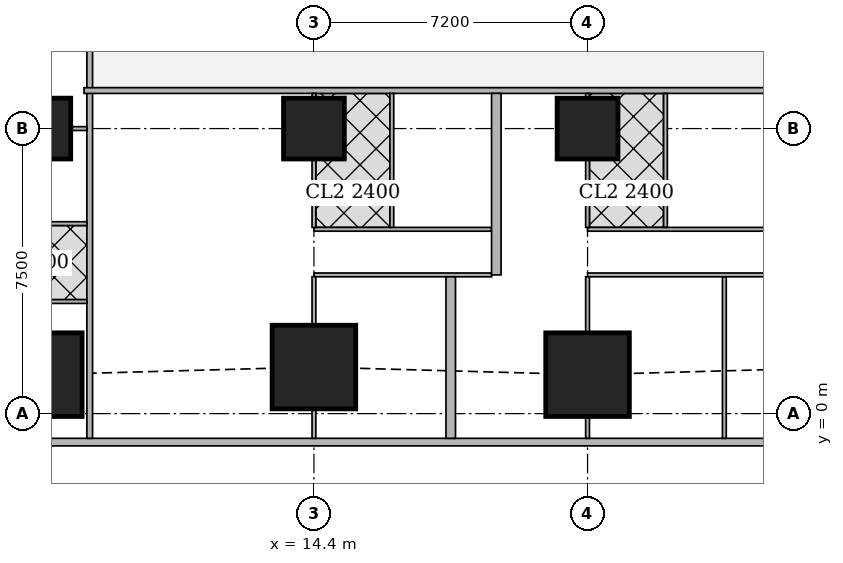
"""IFC4 building model, lengths in metres.
Left out: names, types, materials, properties, quantities, classifications, styles, units other than length and angle.
Written with IfcOpenShell. Run it as: python <this file> out.ifc"""

import sys

from ifc_helpers import new_model, si_unit, direction, frame, frame_2d, origin, origin_2d, place, context, subcontext, project, spatial, rectangle, extrude, element, fill, save


model = new_model("IFC4")
c1 = context("Model", 3, precision=1e-05, world=origin(), true_north=direction((0.0, 1.0)))
c2 = subcontext(c1, "Body", "Model", "MODEL_VIEW")
j1 = project(units=[si_unit("LENGTHUNIT", "METRE"), si_unit("PLANEANGLEUNIT", "RADIAN")], contexts=[c1])
p1 = place(None, origin())
s1 = spatial("IfcSite", under=j1, at=p1, CompositionType="ELEMENT")
p2 = place(p1, origin())
s2 = spatial("IfcBuilding", under=s1, at=p2, CompositionType="ELEMENT")
p3 = place(p2, frame((0.0, 0.0, 111.65)))
s3 = spatial("IfcBuildingStorey", under=s2, at=p3, CompositionType="ELEMENT", Elevation=111.65)
for number, where, z_axis, x_axis in (
    (1, (7.2, 1.025, 0.0), (0.0, 0.0, 1.0), (1.0, 0.0, 0.0)),
    (2, (14.4, 1.225, 0.0), (0.0, 0.0, 1.0), (1.0, 0.0, 0.0)),
    (3, (21.6, 1.025, 0.0), (0.0, 0.0, 1.0), (1.0, 0.0, 0.0)),
):
    element("IfcColumn", number, at=place(p3, frame(where, z_axis=z_axis, x_axis=x_axis)), inside=s3, PredefinedType="COLUMN", context=c2, shape_type="SweptSolid", body=[
        extrude(rectangle(XDim=2.2, YDim=2.2, at=origin_2d()), origin(), (0.0, 0.0, 1.0), 3.75),
    ])
for number, where, z_axis, x_axis in (
    (4, (7.2, 7.5, 0.0), (0.0, 0.0, 1.0), (1.0, 0.0, 0.0)),
    (5, (14.4, 7.5, 0.0), (0.0, 0.0, 1.0), (1.0, 0.0, 0.0)),
    (6, (21.6, 7.5, 0.0), (0.0, 0.0, 1.0), (1.0, 0.0, 0.0)),
):
    element("IfcColumn", number, at=place(p3, frame(where, z_axis=z_axis, x_axis=x_axis)), inside=s3, PredefinedType="COLUMN", context=c2, shape_type="SweptSolid", body=[
        extrude(rectangle(XDim=1.6, YDim=1.6, at=origin_2d()), origin(), (0.0, 0.0, 1.0), 3.75),
    ])
p4 = place(p3, frame((2.163, -0.75, 0.0), z_axis=(0.0, 0.0, 1.0), x_axis=(1.0, 0.0, 0.0)))
e7 = element("IfcWall", 7, at=p4, inside=s3, PredefinedType="SOLIDWALL", context=c2, shape_type="SweptSolid", body=[
    extrude(rectangle(XDim=45.628, YDim=0.2, at=frame_2d((22.814, 0.0))), origin(), (0.0, 0.0, 1.0), 3.5),
])
p5 = place(p4, frame((9.537, 0.0, 0.9)))
e8 = element("IfcOpeningElement", 8, at=p5, cuts=e7, PredefinedType="OPENING", context=c2, shape_type="SweptSolid", body=[
    extrude(rectangle(XDim=1.8, YDim=1.5, at=frame_2d((0.9, 0.75))), frame((0.0, 0.11, 0.0), z_axis=(0.0, -1.0, 0.0), x_axis=(1.0, 0.0, 0.0)), (0.0, 0.0, 1.0), 0.22),
])
p6 = place(p4, frame((13.137, 0.0, 0.9)))
e9 = element("IfcOpeningElement", 9, at=p6, cuts=e7, PredefinedType="OPENING", context=c2, shape_type="SweptSolid", body=[
    extrude(rectangle(XDim=1.8, YDim=1.5, at=frame_2d((0.9, 0.75))), frame((0.0, 0.11, 0.0), z_axis=(0.0, -1.0, 0.0), x_axis=(1.0, 0.0, 0.0)), (0.0, 0.0, 1.0), 0.22),
])
p7 = place(p4, frame((16.737, 0.0, 0.9)))
e10 = element("IfcOpeningElement", 10, at=p7, cuts=e7, PredefinedType="OPENING", context=c2, shape_type="SweptSolid", body=[
    extrude(rectangle(XDim=1.8, YDim=1.5, at=frame_2d((0.9, 0.75))), frame((0.0, 0.11, 0.0), z_axis=(0.0, -1.0, 0.0), x_axis=(1.0, 0.0, 0.0)), (0.0, 0.0, 1.0), 0.22),
])
p8 = place(p4, frame((20.337, 0.0, 0.9)))
e11 = element("IfcOpeningElement", 11, at=p8, cuts=e7, PredefinedType="OPENING", context=c2, shape_type="SweptSolid", body=[
    extrude(rectangle(XDim=1.8, YDim=1.5, at=frame_2d((0.9, 0.75))), frame((0.0, 0.11, 0.0), z_axis=(0.0, -1.0, 0.0), x_axis=(1.0, 0.0, 0.0)), (0.0, 0.0, 1.0), 0.22),
])
p9 = place(p4, frame((23.937, 0.0, 0.9)))
e12 = element("IfcOpeningElement", 12, at=p9, cuts=e7, PredefinedType="OPENING", context=c2, shape_type="SweptSolid", body=[
    extrude(rectangle(XDim=1.8, YDim=1.5, at=frame_2d((0.9, 0.75))), frame((0.0, 0.11, 0.0), z_axis=(0.0, -1.0, 0.0), x_axis=(1.0, 0.0, 0.0)), (0.0, 0.0, 1.0), 0.22),
])
p10 = place(p4, frame((27.537, 0.0, 0.9)))
e13 = element("IfcOpeningElement", 13, at=p10, cuts=e7, PredefinedType="OPENING", context=c2, shape_type="SweptSolid", body=[
    extrude(rectangle(XDim=1.8, YDim=1.5, at=frame_2d((0.9, 0.75))), frame((0.0, 0.11, 0.0), z_axis=(0.0, -1.0, 0.0), x_axis=(1.0, 0.0, 0.0)), (0.0, 0.0, 1.0), 0.22),
])
p11 = place(p4, frame((31.137, 0.0, 0.9)))
e14 = element("IfcOpeningElement", 14, at=p11, cuts=e7, PredefinedType="OPENING", context=c2, shape_type="SweptSolid", body=[
    extrude(rectangle(XDim=1.8, YDim=1.5, at=frame_2d((0.9, 0.75))), frame((0.0, 0.11, 0.0), z_axis=(0.0, -1.0, 0.0), x_axis=(1.0, 0.0, 0.0)), (0.0, 0.0, 1.0), 0.22),
])
p12 = place(p4, frame((34.737, 0.0, 0.9)))
e15 = element("IfcOpeningElement", 15, at=p12, cuts=e7, PredefinedType="OPENING", context=c2, shape_type="SweptSolid", body=[
    extrude(rectangle(XDim=1.8, YDim=1.5, at=frame_2d((0.9, 0.75))), frame((0.0, 0.11, 0.0), z_axis=(0.0, -1.0, 0.0), x_axis=(1.0, 0.0, 0.0)), (0.0, 0.0, 1.0), 0.22),
])
p13 = place(p3, frame((8.5, -0.65, 0.0), z_axis=(0.0, 0.0, 1.0), x_axis=(0.0, 1.0, 0.0)))
e16 = element("IfcWall", 16, at=p13, inside=s3, PredefinedType="SOLIDWALL", context=c2, shape_type="SweptSolid", body=[
    extrude(rectangle(XDim=46.3, YDim=0.15, at=frame_2d((23.15, 0.0))), origin(), (0.0, 0.0, 1.0), 2.2),
])
p14 = place(p13, frame((9.525, 0.0, 0.0)))
e17 = element("IfcOpeningElement", 17, at=p14, cuts=e16, PredefinedType="OPENING", context=c2, shape_type="SweptSolid", body=[
    extrude(rectangle(XDim=1.0, YDim=2.1, at=frame_2d((0.5, 1.05))), frame((0.0, 0.085, 0.0), z_axis=(0.0, -1.0, 0.0), x_axis=(1.0, 0.0, 0.0)), (0.0, 0.0, 1.0), 0.17),
])
p15 = place(p13, frame((13.275, 0.0, 0.0)))
e18 = element("IfcOpeningElement", 18, at=p15, cuts=e16, PredefinedType="OPENING", context=c2, shape_type="SweptSolid", body=[
    extrude(rectangle(XDim=1.0, YDim=2.1, at=frame_2d((0.5, 1.05))), frame((0.0, 0.085, 0.0), z_axis=(0.0, -1.0, 0.0), x_axis=(1.0, 0.0, 0.0)), (0.0, 0.0, 1.0), 0.17),
])
p16 = place(p13, frame((25.15, 0.0, 0.0)))
e19 = element("IfcOpeningElement", 19, at=p16, cuts=e16, PredefinedType="OPENING", context=c2, shape_type="SweptSolid", body=[
    extrude(rectangle(XDim=1.0, YDim=2.1, at=frame_2d((0.5, 1.05))), frame((0.0, 0.085, 0.0), z_axis=(0.0, -1.0, 0.0), x_axis=(1.0, 0.0, 0.0)), (0.0, 0.0, 1.0), 0.17),
])
p17 = place(p3, frame((40.053, 8.5, 0.0), z_axis=(0.0, 0.0, 1.0), x_axis=(-1.0, 0.0, 0.0)))
e20 = element("IfcWall", 20, at=p17, inside=s3, PredefinedType="SOLIDWALL", context=c2, shape_type="SweptSolid", body=[
    extrude(rectangle(XDim=31.703, YDim=0.15, at=frame_2d((15.852, 0.0))), origin(), (0.0, 0.0, 1.0), 3.5),
])
p18 = place(p17, frame((28.103, 0.0, 0.0)))
e21 = element("IfcOpeningElement", 21, at=p18, cuts=e20, PredefinedType="OPENING", context=c2, shape_type="SweptSolid", body=[
    extrude(rectangle(XDim=1.0, YDim=2.1, at=frame_2d((0.5, 1.05))), frame((0.0, 0.085, 0.0), z_axis=(0.0, -1.0, 0.0), x_axis=(1.0, 0.0, 0.0)), (0.0, 0.0, 1.0), 0.17),
])
p19 = place(p17, frame((19.754, 0.0, 0.0)))
e22 = element("IfcOpeningElement", 22, at=p19, cuts=e20, PredefinedType="OPENING", context=c2, shape_type="SweptSolid", body=[
    extrude(rectangle(XDim=1.0, YDim=2.1, at=frame_2d((0.5, 1.05))), frame((0.0, 0.085, 0.0), z_axis=(0.0, -1.0, 0.0), x_axis=(1.0, 0.0, 0.0)), (0.0, 0.0, 1.0), 0.17),
])
p20 = place(p17, frame((8.353, 0.0, 0.0)))
e23 = element("IfcOpeningElement", 23, at=p20, cuts=e20, PredefinedType="OPENING", context=c2, shape_type="SweptSolid", body=[
    extrude(rectangle(XDim=1.0, YDim=2.1, at=frame_2d((0.5, 1.05))), frame((0.0, 0.085, 0.0), z_axis=(0.0, -1.0, 0.0), x_axis=(1.0, 0.0, 0.0)), (0.0, 0.0, 1.0), 0.17),
])
p21 = place(p3, frame((4.9, 4.999, 0.0), z_axis=(0.0, 0.0, 1.0), x_axis=(1.0, 0.0, 0.0)))
e24 = element("IfcWall", 24, at=p21, inside=s3, PredefinedType="PARTITIONING", context=c2, shape_type="SweptSolid", body=[
    extrude(rectangle(XDim=3.525, YDim=0.1, at=frame_2d((1.763, 0.0))), origin(), (0.0, 0.0, 1.0), 3.5),
])
p22 = place(p3, frame((8.001, 7.5, 0.0), z_axis=(0.0, 0.0, 1.0), x_axis=(1.0, 0.0, 0.0)))
e25 = element("IfcWall", 25, at=p22, inside=s3, PredefinedType="PARTITIONING", context=c2, shape_type="SweptSolid", body=[
    extrude(rectangle(XDim=0.424, YDim=0.1, at=frame_2d((0.212, 0.0))), origin(), (0.0, 0.0, 1.0), 3.5),
])
p23 = place(p3, frame((4.9, 2.949, 0.0), z_axis=(0.0, 0.0, 1.0), x_axis=(1.0, 0.0, 0.0)))
e26 = element("IfcWall", 26, at=p23, inside=s3, PredefinedType="PARTITIONING", context=c2, shape_type="SweptSolid", body=[
    extrude(rectangle(XDim=3.525, YDim=0.1, at=frame_2d((1.763, 0.0))), origin(), (0.0, 0.0, 1.0), 3.5),
])
p24 = place(p23, frame((0.45, 0.0, 0.0)))
e27 = element("IfcOpeningElement", 27, at=p24, cuts=e26, PredefinedType="OPENING", context=c2, shape_type="SweptSolid", body=[
    extrude(rectangle(XDim=0.9, YDim=2.1, at=frame_2d((0.45, 1.05))), frame((0.0, 0.06, 0.0), z_axis=(0.0, -1.0, 0.0), x_axis=(1.0, 0.0, 0.0)), (0.0, 0.0, 1.0), 0.12),
])
p25 = place(p3, frame((19.074, 3.65, 0.0), z_axis=(0.0, 0.0, 1.0), x_axis=(-1.0, 0.0, 0.0)))
e28 = element("IfcWall", 28, at=p25, inside=s3, PredefinedType="PARTITIONING", context=c2, shape_type="SweptSolid", body=[
    extrude(rectangle(XDim=4.674, YDim=0.1, at=frame_2d((2.337, 0.0))), origin(), (0.0, 0.0, 1.0), 3.5),
])
p26 = place(p25, frame((3.574, 0.0, 0.0)))
e29 = element("IfcOpeningElement", 29, at=p26, cuts=e28, PredefinedType="OPENING", context=c2, shape_type="SweptSolid", body=[
    extrude(rectangle(XDim=0.9, YDim=2.1, at=frame_2d((0.45, 1.05))), frame((0.0, 0.06, 0.0), z_axis=(0.0, -1.0, 0.0), x_axis=(1.0, 0.0, 0.0)), (0.0, 0.0, 1.0), 0.12),
])
p27 = place(p3, frame((19.074, 4.85, 0.0), z_axis=(0.0, 0.0, 1.0), x_axis=(-1.0, 0.0, 0.0)))
e30 = element("IfcWall", 30, at=p27, inside=s3, PredefinedType="PARTITIONING", context=c2, shape_type="SweptSolid", body=[
    extrude(rectangle(XDim=4.674, YDim=0.1, at=frame_2d((2.337, 0.0))), origin(), (0.0, 0.0, 1.0), 3.5),
])
p28 = place(p27, frame((3.199, 0.0, 0.0)))
e31 = element("IfcOpeningElement", 31, at=p28, cuts=e30, PredefinedType="OPENING", context=c2, shape_type="SweptSolid", body=[
    extrude(rectangle(XDim=0.9, YDim=2.1, at=frame_2d((0.45, 1.05))), frame((0.0, 0.06, 0.0), z_axis=(0.0, -1.0, 0.0), x_axis=(1.0, 0.0, 0.0)), (0.0, 0.0, 1.0), 0.12),
])
p29 = place(p27, frame((0.799, 0.0, 0.0)))
e32 = element("IfcOpeningElement", 32, at=p29, cuts=e30, PredefinedType="OPENING", context=c2, shape_type="SweptSolid", body=[
    extrude(rectangle(XDim=0.9, YDim=2.1, at=frame_2d((0.45, 1.05))), frame((0.0, 0.06, 0.0), z_axis=(0.0, -1.0, 0.0), x_axis=(1.0, 0.0, 0.0)), (0.0, 0.0, 1.0), 0.12),
])
p30 = place(p3, frame((14.4, -0.65, 0.0), z_axis=(0.0, 0.0, 1.0), x_axis=(0.0, 1.0, 0.0)))
e33 = element("IfcWall", 33, at=p30, inside=s3, PredefinedType="PARTITIONING", context=c2, shape_type="SweptSolid", body=[
    extrude(rectangle(XDim=0.774, YDim=0.1, at=frame_2d((0.387, 0.0))), origin(), (0.0, 0.0, 1.0), 3.5),
])
p31 = place(p3, frame((14.4, 2.326, 0.0), z_axis=(0.0, 0.0, 1.0), x_axis=(0.0, 1.0, 0.0)))
e34 = element("IfcWall", 34, at=p31, inside=s3, PredefinedType="PARTITIONING", context=c2, shape_type="SweptSolid", body=[
    extrude(rectangle(XDim=1.274, YDim=0.1, at=frame_2d((0.637, 0.0))), origin(), (0.0, 0.0, 1.0), 3.5),
])
p32 = place(p3, frame((14.4, 4.9, 0.0), z_axis=(0.0, 0.0, 1.0), x_axis=(0.0, 1.0, 0.0)))
e35 = element("IfcWall", 35, at=p32, inside=s3, PredefinedType="PARTITIONING", context=c2, shape_type="SweptSolid", body=[
    extrude(rectangle(XDim=1.799, YDim=0.1, at=frame_2d((0.899, 0.0))), origin(), (0.0, 0.0, 1.0), 3.5),
])
p33 = place(p3, frame((14.4, 8.301, 0.0), z_axis=(0.0, 0.0, 1.0), x_axis=(0.0, 1.0, 0.0)))
e36 = element("IfcWall", 36, at=p33, inside=s3, PredefinedType="PARTITIONING", context=c2, shape_type="SweptSolid", body=[
    extrude(rectangle(XDim=0.124, YDim=0.1, at=frame_2d((0.062, 0.0))), origin(), (0.0, 0.0, 1.0), 3.5),
])
p34 = place(p3, frame((16.45, 4.9, 0.0), z_axis=(0.0, 0.0, 1.0), x_axis=(0.0, 1.0, 0.0)))
e37 = element("IfcWall", 37, at=p34, inside=s3, PredefinedType="PARTITIONING", context=c2, shape_type="SweptSolid", body=[
    extrude(rectangle(XDim=3.525, YDim=0.1, at=frame_2d((1.763, 0.0))), origin(), (0.0, 0.0, 1.0), 3.5),
])
p35 = place(p3, frame((28.675, 3.65, 0.0), z_axis=(0.0, 0.0, 1.0), x_axis=(-1.0, 0.0, 0.0)))
e38 = element("IfcWall", 38, at=p35, inside=s3, PredefinedType="PARTITIONING", context=c2, shape_type="SweptSolid", body=[
    extrude(rectangle(XDim=7.075, YDim=0.1, at=frame_2d((3.538, 0.0))), origin(), (0.0, 0.0, 1.0), 3.5),
])
p36 = place(p35, frame((5.975, 0.0, 0.0)))
e39 = element("IfcOpeningElement", 39, at=p36, cuts=e38, PredefinedType="OPENING", context=c2, shape_type="SweptSolid", body=[
    extrude(rectangle(XDim=0.9, YDim=2.1, at=frame_2d((0.45, 1.05))), frame((0.0, 0.06, 0.0), z_axis=(0.0, -1.0, 0.0), x_axis=(1.0, 0.0, 0.0)), (0.0, 0.0, 1.0), 0.12),
])
p37 = place(p35, frame((2.375, 0.0, 0.0)))
e40 = element("IfcOpeningElement", 40, at=p37, cuts=e38, PredefinedType="OPENING", context=c2, shape_type="SweptSolid", body=[
    extrude(rectangle(XDim=0.9, YDim=2.1, at=frame_2d((0.45, 1.05))), frame((0.0, 0.06, 0.0), z_axis=(0.0, -1.0, 0.0), x_axis=(1.0, 0.0, 0.0)), (0.0, 0.0, 1.0), 0.12),
])
p38 = place(p3, frame((28.675, 4.85, 0.0), z_axis=(0.0, 0.0, 1.0), x_axis=(-1.0, 0.0, 0.0)))
e41 = element("IfcWall", 41, at=p38, inside=s3, PredefinedType="PARTITIONING", context=c2, shape_type="SweptSolid", body=[
    extrude(rectangle(XDim=7.075, YDim=0.1, at=frame_2d((3.538, 0.0))), origin(), (0.0, 0.0, 1.0), 3.5),
])
p39 = place(p38, frame((5.6, 0.0, 0.0)))
e42 = element("IfcOpeningElement", 42, at=p39, cuts=e41, PredefinedType="OPENING", context=c2, shape_type="SweptSolid", body=[
    extrude(rectangle(XDim=0.9, YDim=2.1, at=frame_2d((0.45, 1.05))), frame((0.0, 0.06, 0.0), z_axis=(0.0, -1.0, 0.0), x_axis=(1.0, 0.0, 0.0)), (0.0, 0.0, 1.0), 0.12),
])
p40 = place(p38, frame((0.626, 0.0, 0.0)))
e43 = element("IfcOpeningElement", 43, at=p40, cuts=e41, PredefinedType="OPENING", context=c2, shape_type="SweptSolid", body=[
    extrude(rectangle(XDim=0.9, YDim=2.1, at=frame_2d((0.45, 1.05))), frame((0.0, 0.06, 0.0), z_axis=(0.0, -1.0, 0.0), x_axis=(1.0, 0.0, 0.0)), (0.0, 0.0, 1.0), 0.12),
])
p41 = place(p38, frame((3.201, 0.0, 0.0)))
e44 = element("IfcOpeningElement", 44, at=p41, cuts=e41, PredefinedType="OPENING", context=c2, shape_type="SweptSolid", body=[
    extrude(rectangle(XDim=0.9, YDim=2.1, at=frame_2d((0.45, 1.05))), frame((0.0, 0.06, 0.0), z_axis=(0.0, -1.0, 0.0), x_axis=(1.0, 0.0, 0.0)), (0.0, 0.0, 1.0), 0.12),
])
p42 = place(p3, frame((21.6, -0.65, 0.0), z_axis=(0.0, 0.0, 1.0), x_axis=(0.0, 1.0, 0.0)))
e45 = element("IfcWall", 45, at=p42, inside=s3, PredefinedType="PARTITIONING", context=c2, shape_type="SweptSolid", body=[
    extrude(rectangle(XDim=0.574, YDim=0.1, at=frame_2d((0.287, 0.0))), origin(), (0.0, 0.0, 1.0), 3.5),
])
p43 = place(p3, frame((21.6, 2.126, 0.0), z_axis=(0.0, 0.0, 1.0), x_axis=(0.0, 1.0, 0.0)))
e46 = element("IfcWall", 46, at=p43, inside=s3, PredefinedType="PARTITIONING", context=c2, shape_type="SweptSolid", body=[
    extrude(rectangle(XDim=1.474, YDim=0.1, at=frame_2d((0.737, 0.0))), origin(), (0.0, 0.0, 1.0), 3.5),
])
p44 = place(p3, frame((25.2, -0.65, 0.0), z_axis=(0.0, 0.0, 1.0), x_axis=(0.0, 1.0, 0.0)))
e47 = element("IfcWall", 47, at=p44, inside=s3, PredefinedType="PARTITIONING", context=c2, shape_type="SweptSolid", body=[
    extrude(rectangle(XDim=4.25, YDim=0.1, at=frame_2d((2.125, 0.0))), origin(), (0.0, 0.0, 1.0), 2.2),
])
p45 = place(p3, frame((21.6, 4.9, 0.0), z_axis=(0.0, 0.0, 1.0), x_axis=(0.0, 1.0, 0.0)))
e48 = element("IfcWall", 48, at=p45, inside=s3, PredefinedType="PARTITIONING", context=c2, shape_type="SweptSolid", body=[
    extrude(rectangle(XDim=1.799, YDim=0.1, at=frame_2d((0.899, 0.0))), origin(), (0.0, 0.0, 1.0), 3.5),
])
p46 = place(p3, frame((21.6, 8.301, 0.0), z_axis=(0.0, 0.0, 1.0), x_axis=(0.0, 1.0, 0.0)))
e49 = element("IfcWall", 49, at=p46, inside=s3, PredefinedType="PARTITIONING", context=c2, shape_type="SweptSolid", body=[
    extrude(rectangle(XDim=0.124, YDim=0.1, at=frame_2d((0.062, 0.0))), origin(), (0.0, 0.0, 1.0), 3.5),
])
p47 = place(p3, frame((23.65, 4.9, 0.0), z_axis=(0.0, 0.0, 1.0), x_axis=(0.0, 1.0, 0.0)))
e50 = element("IfcWall", 50, at=p47, inside=s3, PredefinedType="PARTITIONING", context=c2, shape_type="SweptSolid", body=[
    extrude(rectangle(XDim=3.525, YDim=0.1, at=frame_2d((1.763, 0.0))), origin(), (0.0, 0.0, 1.0), 3.5),
])
p48 = place(p3, frame((18.0, -0.65, 0.0), z_axis=(0.0, 0.0, 1.0), x_axis=(0.0, 1.0, 0.0)))
e51 = element("IfcWall", 51, at=p48, inside=s3, PredefinedType="SOLIDWALL", context=c2, shape_type="SweptSolid", body=[
    extrude(rectangle(XDim=4.25, YDim=0.25, at=frame_2d((2.125, 0.0))), origin(), (0.0, 0.0, 1.0), 2.2),
])
p49 = place(p3, frame((19.199, 3.65, 0.0), z_axis=(0.0, 0.0, 1.0), x_axis=(0.0, 1.0, 0.0)))
e52 = element("IfcWall", 52, at=p49, inside=s3, PredefinedType="SOLIDWALL", context=c2, shape_type="SweptSolid", body=[
    extrude(rectangle(XDim=4.775, YDim=0.25, at=frame_2d((2.388, 0.0))), origin(), (0.0, 0.0, 1.0), 3.5),
])
p50 = place(p5, origin())
e53 = element("IfcWindow", 53, at=p50, inside=s3, PartitioningType="SINGLE_PANEL", PredefinedType="WINDOW", context=c2, shape_type="SweptSolid", body=[
    extrude(rectangle(XDim=1.8, YDim=1.5, at=frame_2d((0.9, 0.75))), frame((0.0, 0.03, 0.0), z_axis=(0.0, -1.0, 0.0), x_axis=(1.0, 0.0, 0.0)), (0.0, 0.0, 1.0), 0.06),
])
fill(e8, e53)
p51 = place(p6, origin())
e54 = element("IfcWindow", 54, at=p51, inside=s3, PartitioningType="SINGLE_PANEL", PredefinedType="WINDOW", context=c2, shape_type="SweptSolid", body=[
    extrude(rectangle(XDim=1.8, YDim=1.5, at=frame_2d((0.9, 0.75))), frame((0.0, 0.03, 0.0), z_axis=(0.0, -1.0, 0.0), x_axis=(1.0, 0.0, 0.0)), (0.0, 0.0, 1.0), 0.06),
])
fill(e9, e54)
p52 = place(p7, origin())
e55 = element("IfcWindow", 55, at=p52, inside=s3, PartitioningType="SINGLE_PANEL", PredefinedType="WINDOW", context=c2, shape_type="SweptSolid", body=[
    extrude(rectangle(XDim=1.8, YDim=1.5, at=frame_2d((0.9, 0.75))), frame((0.0, 0.03, 0.0), z_axis=(0.0, -1.0, 0.0), x_axis=(1.0, 0.0, 0.0)), (0.0, 0.0, 1.0), 0.06),
])
fill(e10, e55)
p53 = place(p8, origin())
e56 = element("IfcWindow", 56, at=p53, inside=s3, PartitioningType="SINGLE_PANEL", PredefinedType="WINDOW", context=c2, shape_type="SweptSolid", body=[
    extrude(rectangle(XDim=1.8, YDim=1.5, at=frame_2d((0.9, 0.75))), frame((0.0, 0.03, 0.0), z_axis=(0.0, -1.0, 0.0), x_axis=(1.0, 0.0, 0.0)), (0.0, 0.0, 1.0), 0.06),
])
fill(e11, e56)
p54 = place(p9, origin())
e57 = element("IfcWindow", 57, at=p54, inside=s3, PartitioningType="SINGLE_PANEL", PredefinedType="WINDOW", context=c2, shape_type="SweptSolid", body=[
    extrude(rectangle(XDim=1.8, YDim=1.5, at=frame_2d((0.9, 0.75))), frame((0.0, 0.03, 0.0), z_axis=(0.0, -1.0, 0.0), x_axis=(1.0, 0.0, 0.0)), (0.0, 0.0, 1.0), 0.06),
])
fill(e12, e57)
p55 = place(p14, origin())
e58 = element("IfcDoor", 58, at=p55, inside=s3, OperationType="SINGLE_SWING_LEFT", PredefinedType="DOOR", context=c2, shape_type="SweptSolid", body=[
    extrude(rectangle(XDim=1.0, YDim=2.1, at=frame_2d((0.5, 1.05))), frame((0.0, 0.025, 0.0), z_axis=(0.0, -1.0, 0.0), x_axis=(1.0, 0.0, 0.0)), (0.0, 0.0, 1.0), 0.05),
])
fill(e17, e58)
p56 = place(p26, origin())
e59 = element("IfcDoor", 59, at=p56, inside=s3, OperationType="SINGLE_SWING_RIGHT", PredefinedType="DOOR", context=c2, shape_type="SweptSolid", body=[
    extrude(rectangle(XDim=0.9, YDim=2.1, at=frame_2d((0.45, 1.05))), frame((0.0, 0.025, 0.0), z_axis=(0.0, -1.0, 0.0), x_axis=(1.0, 0.0, 0.0)), (0.0, 0.0, 1.0), 0.05),
])
fill(e29, e59)
p57 = place(p28, origin())
e60 = element("IfcDoor", 60, at=p57, inside=s3, OperationType="SINGLE_SWING_LEFT", PredefinedType="DOOR", context=c2, shape_type="SweptSolid", body=[
    extrude(rectangle(XDim=0.9, YDim=2.1, at=frame_2d((0.45, 1.05))), frame((0.0, 0.025, 0.0), z_axis=(0.0, -1.0, 0.0), x_axis=(1.0, 0.0, 0.0)), (0.0, 0.0, 1.0), 0.05),
])
fill(e31, e60)
p58 = place(p29, origin())
e61 = element("IfcDoor", 61, at=p58, inside=s3, OperationType="SINGLE_SWING_RIGHT", PredefinedType="DOOR", context=c2, shape_type="SweptSolid", body=[
    extrude(rectangle(XDim=0.9, YDim=2.1, at=frame_2d((0.45, 1.05))), frame((0.0, 0.025, 0.0), z_axis=(0.0, -1.0, 0.0), x_axis=(1.0, 0.0, 0.0)), (0.0, 0.0, 1.0), 0.05),
])
fill(e32, e61)
p59 = place(p18, origin())
e62 = element("IfcDoor", 62, at=p59, inside=s3, OperationType="SINGLE_SWING_RIGHT", PredefinedType="DOOR", context=c2, shape_type="SweptSolid", body=[
    extrude(rectangle(XDim=1.0, YDim=2.1, at=frame_2d((0.5, 1.05))), frame((0.0, 0.025, 0.0), z_axis=(0.0, -1.0, 0.0), x_axis=(1.0, 0.0, 0.0)), (0.0, 0.0, 1.0), 0.05),
])
fill(e21, e62)
p60 = place(p36, origin())
e63 = element("IfcDoor", 63, at=p60, inside=s3, OperationType="SINGLE_SWING_RIGHT", PredefinedType="DOOR", context=c2, shape_type="SweptSolid", body=[
    extrude(rectangle(XDim=0.9, YDim=2.1, at=frame_2d((0.45, 1.05))), frame((0.0, 0.025, 0.0), z_axis=(0.0, -1.0, 0.0), x_axis=(1.0, 0.0, 0.0)), (0.0, 0.0, 1.0), 0.05),
])
fill(e39, e63)
p61 = place(p37, origin())
e64 = element("IfcDoor", 64, at=p61, inside=s3, OperationType="SINGLE_SWING_RIGHT", PredefinedType="DOOR", context=c2, shape_type="SweptSolid", body=[
    extrude(rectangle(XDim=0.9, YDim=2.1, at=frame_2d((0.45, 1.05))), frame((0.0, 0.025, 0.0), z_axis=(0.0, -1.0, 0.0), x_axis=(1.0, 0.0, 0.0)), (0.0, 0.0, 1.0), 0.05),
])
fill(e40, e64)
p62 = place(p39, origin())
e65 = element("IfcDoor", 65, at=p62, inside=s3, OperationType="SINGLE_SWING_LEFT", PredefinedType="DOOR", context=c2, shape_type="SweptSolid", body=[
    extrude(rectangle(XDim=0.9, YDim=2.1, at=frame_2d((0.45, 1.05))), frame((0.0, 0.025, 0.0), z_axis=(0.0, -1.0, 0.0), x_axis=(1.0, 0.0, 0.0)), (0.0, 0.0, 1.0), 0.05),
])
fill(e42, e65)
p63 = place(p41, origin())
e66 = element("IfcDoor", 66, at=p63, inside=s3, OperationType="SINGLE_SWING_RIGHT", PredefinedType="DOOR", context=c2, shape_type="SweptSolid", body=[
    extrude(rectangle(XDim=0.9, YDim=2.1, at=frame_2d((0.45, 1.05))), frame((0.0, 0.025, 0.0), z_axis=(0.0, -1.0, 0.0), x_axis=(1.0, 0.0, 0.0)), (0.0, 0.0, 1.0), 0.05),
])
fill(e44, e66)
p64 = place(p19, origin())
e67 = element("IfcDoor", 67, at=p64, inside=s3, OperationType="SINGLE_SWING_RIGHT", PredefinedType="DOOR", context=c2, shape_type="SweptSolid", body=[
    extrude(rectangle(XDim=1.0, YDim=2.1, at=frame_2d((0.5, 1.05))), frame((0.0, 0.025, 0.0), z_axis=(0.0, -1.0, 0.0), x_axis=(1.0, 0.0, 0.0)), (0.0, 0.0, 1.0), 0.05),
])
fill(e22, e67)
save(model, sys.argv[1])
